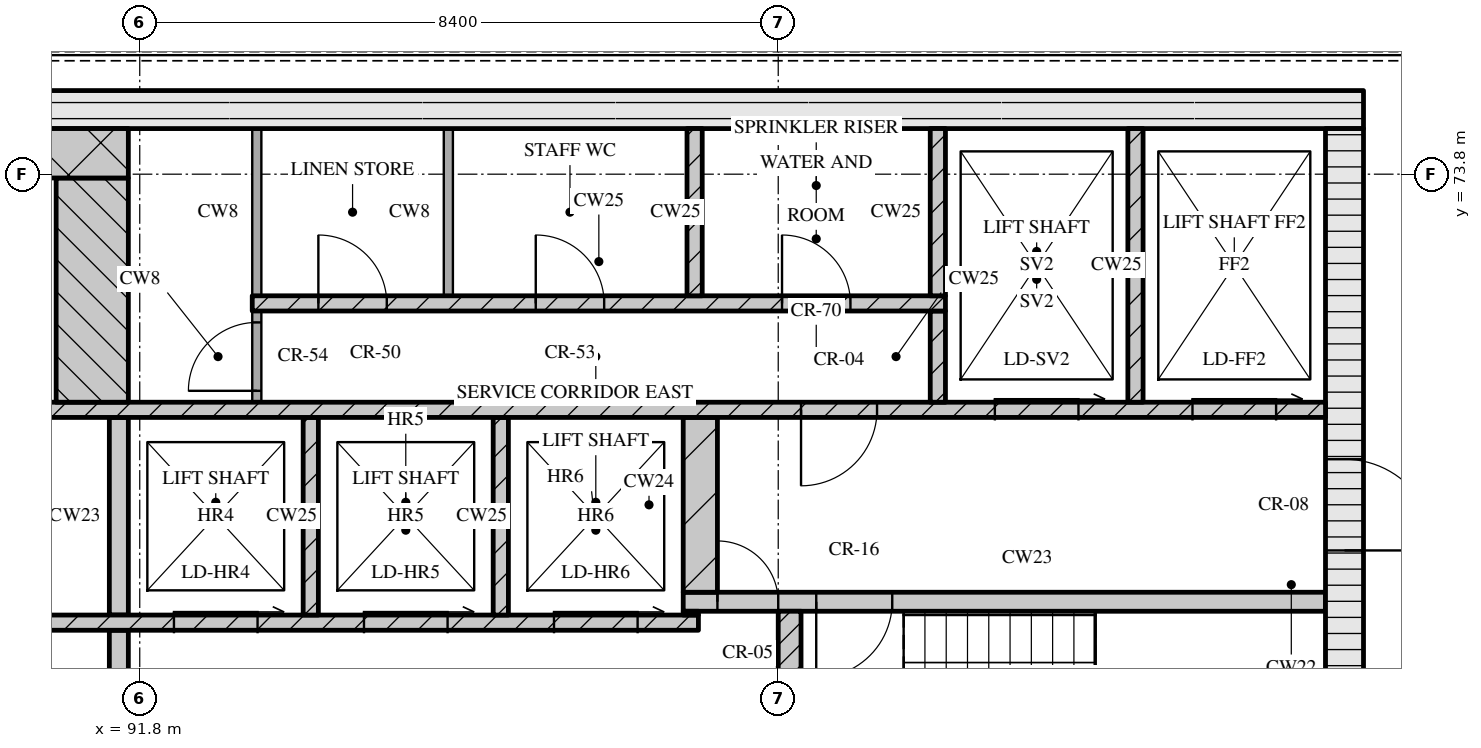
"""IFC4 building model, lengths in metres.
Left out: names, types, materials, properties, quantities, classifications, styles, units other than length and angle.
Written with IfcOpenShell. Run it as: python <this file> out.ifc"""

import sys

from ifc_helpers import new_model, si_unit, direction, frame, frame_2d, origin, place, context, subcontext, project, spatial, rectangle, extrude, element, fill, save


model = new_model("IFC4")
c1 = context("Model", 3, precision=1e-05, world=origin(), true_north=direction((0.0, 1.0)))
c2 = subcontext(c1, "Body", "Model", "MODEL_VIEW")
j1 = project(units=[si_unit("LENGTHUNIT", "METRE"), si_unit("PLANEANGLEUNIT", "RADIAN")], contexts=[c1])
p1 = place(None, origin())
s1 = spatial("IfcSite", under=j1, at=p1, CompositionType="ELEMENT")
p2 = place(p1, origin())
s2 = spatial("IfcBuilding", under=s1, at=p2, CompositionType="ELEMENT")
p3 = place(p2, frame((0.0, 0.0, 299.55)))
s3 = spatial("IfcBuildingStorey", under=s2, at=p3, CompositionType="ELEMENT", Elevation=299.55)
p4 = place(p3, frame((67.3, 74.65, 0.0), z_axis=(0.0, 0.0, 1.0), x_axis=(1.0, 0.0, 0.0)))
e1 = element("IfcWall", 1, at=p4, inside=s3, PredefinedType="SOLIDWALL", context=c2, shape_type="SweptSolid", body=[
    extrude(rectangle(XDim=40.6, YDim=0.5, at=frame_2d((20.3, 0.0))), origin(), (0.0, 0.0, 1.0), 3.32),
])
p5 = place(p3, frame((107.65, 62.4, 0.0), z_axis=(0.0, 0.0, 1.0), x_axis=(0.0, 1.0, 0.0)))
e2 = element("IfcWall", 2, at=p5, inside=s3, PredefinedType="SOLIDWALL", context=c2, shape_type="SweptSolid", body=[
    extrude(rectangle(XDim=12.0, YDim=0.5, at=frame_2d((6.0, 0.0))), origin(), (0.0, 0.0, 1.0), 3.32),
])
p6 = place(p5, frame((6.45, 0.0, 0.0)))
e3 = element("IfcOpeningElement", 3, at=p6, cuts=e2, PredefinedType="OPENING", context=c2, shape_type="SweptSolid", body=[
    extrude(rectangle(XDim=1.2, YDim=2.1, at=frame_2d((0.6, 1.05))), frame((0.0, 0.26, 0.0), z_axis=(0.0, -1.0, 0.0), x_axis=(1.0, 0.0, 0.0)), (0.0, 0.0, 1.0), 0.52),
])
p7 = place(p3, frame((91.525, 65.2, 0.0), z_axis=(0.0, 0.0, 1.0), x_axis=(0.0, 1.0, 0.0)))
e4 = element("IfcWall", 4, at=p7, inside=s3, PredefinedType="SOLIDWALL", context=c2, shape_type="SweptSolid", body=[
    extrude(rectangle(XDim=2.6, YDim=0.25, at=frame_2d((1.3, 0.0))), origin(), (0.0, 0.0, 1.0), 3.32),
])
p8 = place(p7, frame((0.7, 0.0, 0.0)))
e5 = element("IfcOpeningElement", 5, at=p8, cuts=e4, PredefinedType="OPENING", context=c2, shape_type="SweptSolid", body=[
    extrude(rectangle(XDim=1.2, YDim=2.1, at=frame_2d((0.6, 1.05))), frame((0.0, 0.135, 0.0), z_axis=(0.0, -1.0, 0.0), x_axis=(1.0, 0.0, 0.0)), (0.0, 0.0, 1.0), 0.27),
])
p9 = place(p3, frame((100.35, 65.2, 0.0), z_axis=(0.0, 0.0, 1.0), x_axis=(0.0, 1.0, 0.0)))
e6 = element("IfcWall", 6, at=p9, inside=s3, PredefinedType="SOLIDWALL", context=c2, shape_type="SweptSolid", body=[
    extrude(rectangle(XDim=2.85, YDim=0.3, at=frame_2d((1.425, 0.0))), origin(), (0.0, 0.0, 1.0), 3.32),
])
p10 = place(p3, frame((76.05, 67.9, 0.0), z_axis=(0.0, 0.0, 1.0), x_axis=(1.0, 0.0, 0.0)))
e7 = element("IfcWall", 7, at=p10, inside=s3, PredefinedType="SOLIDWALL", context=c2, shape_type="SweptSolid", body=[
    extrude(rectangle(XDim=23.1, YDim=0.2, at=frame_2d((11.55, 0.0))), origin(), (0.0, 0.0, 1.0), 3.32),
])
p11 = place(p10, frame((1.4, 0.0, 0.0)))
e8 = element("IfcOpeningElement", 8, at=p11, cuts=e7, PredefinedType="OPENING", context=c2, shape_type="SweptSolid", body=[
    extrude(rectangle(XDim=0.9, YDim=2.1, at=frame_2d((0.45, 1.05))), frame((0.0, 0.11, 0.0), z_axis=(0.0, -1.0, 0.0), x_axis=(1.0, 0.0, 0.0)), (0.0, 0.0, 1.0), 0.22),
])
p12 = place(p10, frame((5.11, 0.0, 0.0)))
e9 = element("IfcOpeningElement", 9, at=p12, cuts=e7, PredefinedType="OPENING", context=c2, shape_type="SweptSolid", body=[
    extrude(rectangle(XDim=0.9, YDim=2.1, at=frame_2d((0.45, 1.05))), frame((0.0, 0.11, 0.0), z_axis=(0.0, -1.0, 0.0), x_axis=(1.0, 0.0, 0.0)), (0.0, 0.0, 1.0), 0.22),
])
p13 = place(p10, frame((8.45, 0.0, 0.0)))
e10 = element("IfcOpeningElement", 10, at=p13, cuts=e7, PredefinedType="OPENING", context=c2, shape_type="SweptSolid", body=[
    extrude(rectangle(XDim=0.9, YDim=2.1, at=frame_2d((0.45, 1.05))), frame((0.0, 0.11, 0.0), z_axis=(0.0, -1.0, 0.0), x_axis=(1.0, 0.0, 0.0)), (0.0, 0.0, 1.0), 0.22),
])
p14 = place(p10, frame((10.91, 0.0, 0.0)))
e11 = element("IfcOpeningElement", 11, at=p14, cuts=e7, PredefinedType="OPENING", context=c2, shape_type="SweptSolid", body=[
    extrude(rectangle(XDim=0.9, YDim=2.1, at=frame_2d((0.45, 1.05))), frame((0.0, 0.11, 0.0), z_axis=(0.0, -1.0, 0.0), x_axis=(1.0, 0.0, 0.0)), (0.0, 0.0, 1.0), 0.22),
])
p15 = place(p10, frame((13.55, 0.0, 0.0)))
e12 = element("IfcOpeningElement", 12, at=p15, cuts=e7, PredefinedType="OPENING", context=c2, shape_type="SweptSolid", body=[
    extrude(rectangle(XDim=1.0, YDim=2.1, at=frame_2d((0.5, 1.05))), frame((0.0, 0.11, 0.0), z_axis=(0.0, -1.0, 0.0), x_axis=(1.0, 0.0, 0.0)), (0.0, 0.0, 1.0), 0.22),
])
p16 = place(p10, frame((16.2, 0.0, 0.0)))
e13 = element("IfcOpeningElement", 13, at=p16, cuts=e7, PredefinedType="OPENING", context=c2, shape_type="SweptSolid", body=[
    extrude(rectangle(XDim=1.1, YDim=2.1, at=frame_2d((0.55, 1.05))), frame((0.0, 0.11, 0.0), z_axis=(0.0, -1.0, 0.0), x_axis=(1.0, 0.0, 0.0)), (0.0, 0.0, 1.0), 0.22),
])
p17 = place(p10, frame((18.7, 0.0, 0.0)))
e14 = element("IfcOpeningElement", 14, at=p17, cuts=e7, PredefinedType="OPENING", context=c2, shape_type="SweptSolid", body=[
    extrude(rectangle(XDim=1.1, YDim=2.1, at=frame_2d((0.55, 1.05))), frame((0.0, 0.11, 0.0), z_axis=(0.0, -1.0, 0.0), x_axis=(1.0, 0.0, 0.0)), (0.0, 0.0, 1.0), 0.22),
])
p18 = place(p10, frame((21.2, 0.0, 0.0)))
e15 = element("IfcOpeningElement", 15, at=p18, cuts=e7, PredefinedType="OPENING", context=c2, shape_type="SweptSolid", body=[
    extrude(rectangle(XDim=1.1, YDim=2.1, at=frame_2d((0.55, 1.05))), frame((0.0, 0.11, 0.0), z_axis=(0.0, -1.0, 0.0), x_axis=(1.0, 0.0, 0.0)), (0.0, 0.0, 1.0), 0.22),
])
p19 = place(p3, frame((91.525, 68.0, 0.0), z_axis=(0.0, 0.0, 1.0), x_axis=(0.0, 1.0, 0.0)))
e16 = element("IfcWall", 16, at=p19, inside=s3, PredefinedType="SOLIDWALL", context=c2, shape_type="SweptSolid", body=[
    extrude(rectangle(XDim=2.6, YDim=0.25, at=frame_2d((1.3, 0.0))), origin(), (0.0, 0.0, 1.0), 3.32),
])
for number, where, z_axis, x_axis in (
    (17, (94.05, 68.0, 0.0), (0.0, 0.0, 1.0), (0.0, 1.0, 0.0)),
    (18, (96.55, 68.0, 0.0), (0.0, 0.0, 1.0), (0.0, 1.0, 0.0)),
):
    element("IfcWall", number, at=place(p3, frame(where, z_axis=z_axis, x_axis=x_axis)), inside=s3, PredefinedType="SOLIDWALL", context=c2, shape_type="SweptSolid", body=[
        extrude(rectangle(XDim=2.6, YDim=0.2, at=frame_2d((1.3, 0.0))), origin(), (0.0, 0.0, 1.0), 3.32),
    ])
p20 = place(p3, frame((98.95, 68.025, 0.0), z_axis=(0.0, 0.0, 1.0), x_axis=(1.0, 0.0, 0.0)))
e19 = element("IfcWall", 19, at=p20, inside=s3, PredefinedType="SOLIDWALL", context=c2, shape_type="SweptSolid", body=[
    extrude(rectangle(XDim=0.2, YDim=0.05, at=frame_2d((0.1, 0.0))), origin(), (0.0, 0.0, 1.0), 3.32),
])
p21 = place(p3, frame((98.95, 68.175, 0.0), z_axis=(0.0, 0.0, 1.0), x_axis=(1.0, 0.0, 0.0)))
e20 = element("IfcWall", 20, at=p21, inside=s3, PredefinedType="SOLIDWALL", context=c2, shape_type="SweptSolid", body=[
    extrude(rectangle(XDim=8.45, YDim=0.25, at=frame_2d((4.225, 0.0))), origin(), (0.0, 0.0, 1.0), 3.32),
])
p22 = place(p21, frame((0.45, 0.0, 0.0)))
e21 = element("IfcOpeningElement", 21, at=p22, cuts=e20, PredefinedType="OPENING", context=c2, shape_type="SweptSolid", body=[
    extrude(rectangle(XDim=0.8, YDim=2.1, at=frame_2d((0.4, 1.05))), frame((0.0, 0.135, 0.0), z_axis=(0.0, -1.0, 0.0), x_axis=(1.0, 0.0, 0.0)), (0.0, 0.0, 1.0), 0.27),
])
p23 = place(p21, frame((1.75, 0.0, 0.0)))
e22 = element("IfcOpeningElement", 22, at=p23, cuts=e20, PredefinedType="OPENING", context=c2, shape_type="SweptSolid", body=[
    extrude(rectangle(XDim=1.0, YDim=2.1, at=frame_2d((0.5, 1.05))), frame((0.0, 0.135, 0.0), z_axis=(0.0, -1.0, 0.0), x_axis=(1.0, 0.0, 0.0)), (0.0, 0.0, 1.0), 0.27),
])
p24 = place(p3, frame((99.175, 68.3, 0.0), z_axis=(0.0, 0.0, 1.0), x_axis=(0.0, 1.0, 0.0)))
e23 = element("IfcWall", 23, at=p24, inside=s3, PredefinedType="SOLIDWALL", context=c2, shape_type="SweptSolid", body=[
    extrude(rectangle(XDim=2.3, YDim=0.45, at=frame_2d((1.15, 0.0))), origin(), (0.0, 0.0, 1.0), 3.32),
])
p25 = place(p3, frame((67.8, 70.7, 0.0), z_axis=(0.0, 0.0, 1.0), x_axis=(1.0, 0.0, 0.0)))
e24 = element("IfcWall", 24, at=p25, inside=s3, PredefinedType="SOLIDWALL", context=c2, shape_type="SweptSolid", body=[
    extrude(rectangle(XDim=39.6, YDim=0.2, at=frame_2d((19.8, 0.0))), origin(), (0.0, 0.0, 1.0), 3.32),
])
p26 = place(p25, frame((0.65, 0.0, 0.0)))
e25 = element("IfcOpeningElement", 25, at=p26, cuts=e24, PredefinedType="OPENING", context=c2, shape_type="SweptSolid", body=[
    extrude(rectangle(XDim=1.1, YDim=2.1, at=frame_2d((0.55, 1.05))), frame((0.0, 0.11, 0.0), z_axis=(0.0, -1.0, 0.0), x_axis=(1.0, 0.0, 0.0)), (0.0, 0.0, 1.0), 0.22),
])
p27 = place(p25, frame((3.25, 0.0, 0.0)))
e26 = element("IfcOpeningElement", 26, at=p27, cuts=e24, PredefinedType="OPENING", context=c2, shape_type="SweptSolid", body=[
    extrude(rectangle(XDim=1.1, YDim=2.1, at=frame_2d((0.55, 1.05))), frame((0.0, 0.11, 0.0), z_axis=(0.0, -1.0, 0.0), x_axis=(1.0, 0.0, 0.0)), (0.0, 0.0, 1.0), 0.22),
])
p28 = place(p25, frame((5.9, 0.0, 0.0)))
e27 = element("IfcOpeningElement", 27, at=p28, cuts=e24, PredefinedType="OPENING", context=c2, shape_type="SweptSolid", body=[
    extrude(rectangle(XDim=1.0, YDim=2.1, at=frame_2d((0.5, 1.05))), frame((0.0, 0.11, 0.0), z_axis=(0.0, -1.0, 0.0), x_axis=(1.0, 0.0, 0.0)), (0.0, 0.0, 1.0), 0.22),
])
p29 = place(p25, frame((21.7, 0.0, 0.0)))
e28 = element("IfcOpeningElement", 28, at=p29, cuts=e24, PredefinedType="OPENING", context=c2, shape_type="SweptSolid", body=[
    extrude(rectangle(XDim=1.0, YDim=2.1, at=frame_2d((0.5, 1.05))), frame((0.0, 0.11, 0.0), z_axis=(0.0, -1.0, 0.0), x_axis=(1.0, 0.0, 0.0)), (0.0, 0.0, 1.0), 0.22),
])
p30 = place(p25, frame((32.7, 0.0, 0.0)))
e29 = element("IfcOpeningElement", 29, at=p30, cuts=e24, PredefinedType="OPENING", context=c2, shape_type="SweptSolid", body=[
    extrude(rectangle(XDim=1.0, YDim=2.1, at=frame_2d((0.5, 1.05))), frame((0.0, 0.11, 0.0), z_axis=(0.0, -1.0, 0.0), x_axis=(1.0, 0.0, 0.0)), (0.0, 0.0, 1.0), 0.22),
])
p31 = place(p25, frame((35.25, 0.0, 0.0)))
e30 = element("IfcOpeningElement", 30, at=p31, cuts=e24, PredefinedType="OPENING", context=c2, shape_type="SweptSolid", body=[
    extrude(rectangle(XDim=1.1, YDim=2.1, at=frame_2d((0.55, 1.05))), frame((0.0, 0.11, 0.0), z_axis=(0.0, -1.0, 0.0), x_axis=(1.0, 0.0, 0.0)), (0.0, 0.0, 1.0), 0.22),
])
p32 = place(p25, frame((37.85, 0.0, 0.0)))
e31 = element("IfcOpeningElement", 31, at=p32, cuts=e24, PredefinedType="OPENING", context=c2, shape_type="SweptSolid", body=[
    extrude(rectangle(XDim=1.1, YDim=2.1, at=frame_2d((0.55, 1.05))), frame((0.0, 0.11, 0.0), z_axis=(0.0, -1.0, 0.0), x_axis=(1.0, 0.0, 0.0)), (0.0, 0.0, 1.0), 0.22),
])
p33 = place(p3, frame((91.175, 70.8, 0.0), z_axis=(0.0, 0.0, 1.0), x_axis=(0.0, 1.0, 0.0)))
e32 = element("IfcWall", 32, at=p33, inside=s3, PredefinedType="SOLIDWALL", context=c2, shape_type="SweptSolid", body=[
    extrude(rectangle(XDim=2.95, YDim=0.95, at=frame_2d((1.475, 0.0))), origin(), (0.0, 0.0, 1.0), 3.32),
])
p34 = place(p3, frame((93.34, 70.8, 0.0), z_axis=(0.0, 0.0, 1.0), x_axis=(0.0, 1.0, 0.0)))
e33 = element("IfcWall", 33, at=p34, inside=s3, PredefinedType="PARTITIONING", context=c2, shape_type="SweptSolid", body=[
    extrude(rectangle(XDim=1.2, YDim=0.12, at=frame_2d((0.6, 0.0))), origin(), (0.0, 0.0, 1.0), 3.32),
])
p35 = place(p34, frame((0.15, 0.0, 0.0)))
e34 = element("IfcOpeningElement", 34, at=p35, cuts=e33, PredefinedType="OPENING", context=c2, shape_type="SweptSolid", body=[
    extrude(rectangle(XDim=0.9, YDim=2.1, at=frame_2d((0.45, 1.05))), frame((0.0, 0.07, 0.0), z_axis=(0.0, -1.0, 0.0), x_axis=(1.0, 0.0, 0.0)), (0.0, 0.0, 1.0), 0.14),
])
p36 = place(p3, frame((102.3, 70.8, 0.0), z_axis=(0.0, 0.0, 1.0), x_axis=(0.0, 1.0, 0.0)))
e35 = element("IfcWall", 35, at=p36, inside=s3, PredefinedType="SOLIDWALL", context=c2, shape_type="SweptSolid", body=[
    extrude(rectangle(XDim=1.2, YDim=0.2, at=frame_2d((0.6, 0.0))), origin(), (0.0, 0.0, 1.0), 3.32),
])
p37 = place(p3, frame((104.9, 70.8, 0.0), z_axis=(0.0, 0.0, 1.0), x_axis=(0.0, 1.0, 0.0)))
e36 = element("IfcWall", 36, at=p37, inside=s3, PredefinedType="SOLIDWALL", context=c2, shape_type="SweptSolid", body=[
    extrude(rectangle(XDim=3.6, YDim=0.2, at=frame_2d((1.8, 0.0))), origin(), (0.0, 0.0, 1.0), 3.32),
])
p38 = place(p3, frame((93.28, 72.1, 0.0), z_axis=(0.0, 0.0, 1.0), x_axis=(1.0, 0.0, 0.0)))
e37 = element("IfcWall", 37, at=p38, inside=s3, PredefinedType="SOLIDWALL", context=c2, shape_type="SweptSolid", body=[
    extrude(rectangle(XDim=9.12, YDim=0.2, at=frame_2d((4.56, 0.0))), origin(), (0.0, 0.0, 1.0), 3.32),
])
p39 = place(p38, frame((0.87, 0.0, 0.0)))
e38 = element("IfcOpeningElement", 38, at=p39, cuts=e37, PredefinedType="OPENING", context=c2, shape_type="SweptSolid", body=[
    extrude(rectangle(XDim=0.9, YDim=2.1, at=frame_2d((0.45, 1.05))), frame((0.0, 0.11, 0.0), z_axis=(0.0, -1.0, 0.0), x_axis=(1.0, 0.0, 0.0)), (0.0, 0.0, 1.0), 0.22),
])
p40 = place(p38, frame((3.73, 0.0, 0.0)))
e39 = element("IfcOpeningElement", 39, at=p40, cuts=e37, PredefinedType="OPENING", context=c2, shape_type="SweptSolid", body=[
    extrude(rectangle(XDim=0.9, YDim=2.1, at=frame_2d((0.45, 1.05))), frame((0.0, 0.11, 0.0), z_axis=(0.0, -1.0, 0.0), x_axis=(1.0, 0.0, 0.0)), (0.0, 0.0, 1.0), 0.22),
])
p41 = place(p38, frame((6.97, 0.0, 0.0)))
e40 = element("IfcOpeningElement", 40, at=p41, cuts=e37, PredefinedType="OPENING", context=c2, shape_type="SweptSolid", body=[
    extrude(rectangle(XDim=0.9, YDim=2.1, at=frame_2d((0.45, 1.05))), frame((0.0, 0.11, 0.0), z_axis=(0.0, -1.0, 0.0), x_axis=(1.0, 0.0, 0.0)), (0.0, 0.0, 1.0), 0.22),
])
for number, where, z_axis, x_axis in (
    (41, (93.34, 72.2, 0.0), (0.0, 0.0, 1.0), (0.0, 1.0, 0.0)),
    (42, (95.86, 72.2, 0.0), (0.0, 0.0, 1.0), (0.0, 1.0, 0.0)),
):
    element("IfcWall", number, at=place(p3, frame(where, z_axis=z_axis, x_axis=x_axis)), inside=s3, PredefinedType="PARTITIONING", context=c2, shape_type="SweptSolid", body=[
        extrude(rectangle(XDim=2.2, YDim=0.12, at=frame_2d((1.1, 0.0))), origin(), (0.0, 0.0, 1.0), 3.32),
    ])
for number, where, z_axis, x_axis in (
    (43, (99.1, 72.2, 0.0), (0.0, 0.0, 1.0), (0.0, 1.0, 0.0)),
    (44, (102.3, 72.2, 0.0), (0.0, 0.0, 1.0), (0.0, 1.0, 0.0)),
):
    element("IfcWall", number, at=place(p3, frame(where, z_axis=z_axis, x_axis=x_axis)), inside=s3, PredefinedType="SOLIDWALL", context=c2, shape_type="SweptSolid", body=[
        extrude(rectangle(XDim=2.2, YDim=0.2, at=frame_2d((1.1, 0.0))), origin(), (0.0, 0.0, 1.0), 3.32),
    ])
p42 = place(p3, frame((83.55, 74.075, 0.0), z_axis=(0.0, 0.0, 1.0), x_axis=(1.0, 0.0, 0.0)))
e45 = element("IfcWall", 45, at=p42, inside=s3, PredefinedType="SOLIDWALL", context=c2, shape_type="SweptSolid", body=[
    extrude(rectangle(XDim=8.1, YDim=0.65, at=frame_2d((4.05, 0.0))), origin(), (0.0, 0.0, 1.0), 3.32),
])
p43 = place(p16, origin())
e46 = element("IfcDoor", 46, at=p43, inside=s3, OperationType="SLIDING_TO_RIGHT", PredefinedType="DOOR", context=c2, shape_type="SweptSolid", body=[
    extrude(rectangle(XDim=1.1, YDim=2.1, at=frame_2d((0.55, 1.05))), frame((0.0, 0.025, 0.0), z_axis=(0.0, -1.0, 0.0), x_axis=(1.0, 0.0, 0.0)), (0.0, 0.0, 1.0), 0.05),
])
fill(e13, e46)
p44 = place(p17, origin())
e47 = element("IfcDoor", 47, at=p44, inside=s3, OperationType="SLIDING_TO_RIGHT", PredefinedType="DOOR", context=c2, shape_type="SweptSolid", body=[
    extrude(rectangle(XDim=1.1, YDim=2.1, at=frame_2d((0.55, 1.05))), frame((0.0, 0.025, 0.0), z_axis=(0.0, -1.0, 0.0), x_axis=(1.0, 0.0, 0.0)), (0.0, 0.0, 1.0), 0.05),
])
fill(e14, e47)
p45 = place(p18, origin())
e48 = element("IfcDoor", 48, at=p45, inside=s3, OperationType="SLIDING_TO_RIGHT", PredefinedType="DOOR", context=c2, shape_type="SweptSolid", body=[
    extrude(rectangle(XDim=1.1, YDim=2.1, at=frame_2d((0.55, 1.05))), frame((0.0, 0.025, 0.0), z_axis=(0.0, -1.0, 0.0), x_axis=(1.0, 0.0, 0.0)), (0.0, 0.0, 1.0), 0.05),
])
fill(e15, e48)
p46 = place(p22, origin())
e49 = element("IfcDoor", 49, at=p46, inside=s3, OperationType="SINGLE_SWING_LEFT", PredefinedType="DOOR", context=c2, shape_type="SweptSolid", body=[
    extrude(rectangle(XDim=0.8, YDim=2.1, at=frame_2d((0.4, 1.05))), frame((0.0, 0.025, 0.0), z_axis=(0.0, -1.0, 0.0), x_axis=(1.0, 0.0, 0.0)), (0.0, 0.0, 1.0), 0.05),
])
fill(e21, e49)
p47 = place(p23, origin())
e50 = element("IfcDoor", 50, at=p47, inside=s3, OperationType="SINGLE_SWING_RIGHT", PredefinedType="DOOR", context=c2, shape_type="SweptSolid", body=[
    extrude(rectangle(XDim=1.0, YDim=2.1, at=frame_2d((0.5, 1.05))), frame((0.0, 0.025, 0.0), z_axis=(0.0, -1.0, 0.0), x_axis=(1.0, 0.0, 0.0)), (0.0, 0.0, 1.0), 0.05),
])
fill(e22, e50)
p48 = place(p6, origin())
e51 = element("IfcDoor", 51, at=p48, inside=s3, OperationType="SINGLE_SWING_RIGHT", PredefinedType="DOOR", context=c2, shape_type="SweptSolid", body=[
    extrude(rectangle(XDim=1.2, YDim=2.1, at=frame_2d((0.6, 1.05))), frame((0.0, 0.025, 0.0), z_axis=(0.0, -1.0, 0.0), x_axis=(1.0, 0.0, 0.0)), (0.0, 0.0, 1.0), 0.05),
])
fill(e3, e51)
p49 = place(p30, origin())
e52 = element("IfcDoor", 52, at=p49, inside=s3, OperationType="SINGLE_SWING_RIGHT", PredefinedType="DOOR", context=c2, shape_type="SweptSolid", body=[
    extrude(rectangle(XDim=1.0, YDim=2.1, at=frame_2d((0.5, 1.05))), frame((0.0, 0.025, 0.0), z_axis=(0.0, -1.0, 0.0), x_axis=(1.0, 0.0, 0.0)), (0.0, 0.0, 1.0), 0.05),
])
fill(e29, e52)
p50 = place(p31, origin())
e53 = element("IfcDoor", 53, at=p50, inside=s3, OperationType="SLIDING_TO_RIGHT", PredefinedType="DOOR", context=c2, shape_type="SweptSolid", body=[
    extrude(rectangle(XDim=1.1, YDim=2.1, at=frame_2d((0.55, 1.05))), frame((0.0, 0.025, 0.0), z_axis=(0.0, -1.0, 0.0), x_axis=(1.0, 0.0, 0.0)), (0.0, 0.0, 1.0), 0.05),
])
fill(e30, e53)
p51 = place(p32, origin())
e54 = element("IfcDoor", 54, at=p51, inside=s3, OperationType="SLIDING_TO_RIGHT", PredefinedType="DOOR", context=c2, shape_type="SweptSolid", body=[
    extrude(rectangle(XDim=1.1, YDim=2.1, at=frame_2d((0.55, 1.05))), frame((0.0, 0.025, 0.0), z_axis=(0.0, -1.0, 0.0), x_axis=(1.0, 0.0, 0.0)), (0.0, 0.0, 1.0), 0.05),
])
fill(e31, e54)
p52 = place(p35, origin())
e55 = element("IfcDoor", 55, at=p52, inside=s3, OperationType="SINGLE_SWING_LEFT", PredefinedType="DOOR", context=c2, shape_type="SweptSolid", body=[
    extrude(rectangle(XDim=0.9, YDim=2.1, at=frame_2d((0.45, 1.05))), frame((0.0, 0.025, 0.0), z_axis=(0.0, -1.0, 0.0), x_axis=(1.0, 0.0, 0.0)), (0.0, 0.0, 1.0), 0.05),
])
fill(e34, e55)
p53 = place(p39, origin())
e56 = element("IfcDoor", 56, at=p53, inside=s3, OperationType="SINGLE_SWING_LEFT", PredefinedType="DOOR", context=c2, shape_type="SweptSolid", body=[
    extrude(rectangle(XDim=0.9, YDim=2.1, at=frame_2d((0.45, 1.05))), frame((0.0, 0.025, 0.0), z_axis=(0.0, -1.0, 0.0), x_axis=(1.0, 0.0, 0.0)), (0.0, 0.0, 1.0), 0.05),
])
fill(e38, e56)
p54 = place(p40, origin())
e57 = element("IfcDoor", 57, at=p54, inside=s3, OperationType="SINGLE_SWING_LEFT", PredefinedType="DOOR", context=c2, shape_type="SweptSolid", body=[
    extrude(rectangle(XDim=0.9, YDim=2.1, at=frame_2d((0.45, 1.05))), frame((0.0, 0.025, 0.0), z_axis=(0.0, -1.0, 0.0), x_axis=(1.0, 0.0, 0.0)), (0.0, 0.0, 1.0), 0.05),
])
fill(e39, e57)
p55 = place(p41, origin())
e58 = element("IfcDoor", 58, at=p55, inside=s3, OperationType="SINGLE_SWING_LEFT", PredefinedType="DOOR", context=c2, shape_type="SweptSolid", body=[
    extrude(rectangle(XDim=0.9, YDim=2.1, at=frame_2d((0.45, 1.05))), frame((0.0, 0.025, 0.0), z_axis=(0.0, -1.0, 0.0), x_axis=(1.0, 0.0, 0.0)), (0.0, 0.0, 1.0), 0.05),
])
fill(e40, e58)
save(model, sys.argv[1])
